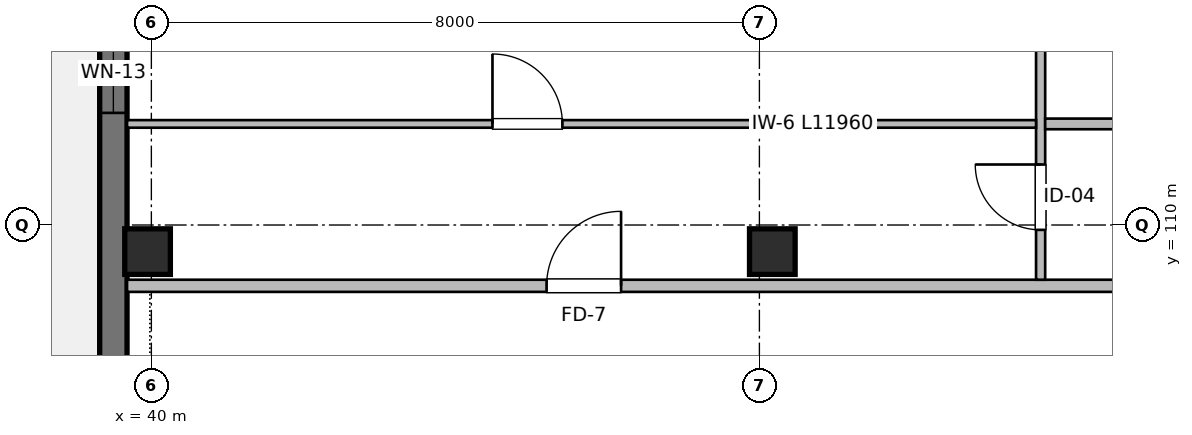
"""IFC4 building model, lengths in metres.
Left out: names, types, materials, properties, quantities, classifications, styles, units other than length and angle.
Written with IfcOpenShell. Run it as: python <this file> out.ifc"""

import sys

from ifc_helpers import new_model, si_unit, direction, frame, frame_2d, origin, origin_2d, place, context, subcontext, project, spatial, rectangle, extrude, element, fill, save


model = new_model("IFC4")
c1 = context("Model", 3, precision=1e-05, world=origin(), true_north=direction((0.0, 1.0)))
c2 = subcontext(c1, "Body", "Model", "MODEL_VIEW")
j1 = project(units=[si_unit("LENGTHUNIT", "METRE"), si_unit("PLANEANGLEUNIT", "RADIAN")], contexts=[c1])
p1 = place(None, origin())
s1 = spatial("IfcSite", under=j1, at=p1, CompositionType="ELEMENT")
p2 = place(p1, origin())
s2 = spatial("IfcBuilding", under=s1, at=p2, CompositionType="ELEMENT")
p3 = place(p2, frame((0.0, 0.0, 10.56)))
s3 = spatial("IfcBuildingStorey", under=s2, at=p3, CompositionType="ELEMENT", Elevation=10.56)
for number, where, z_axis, x_axis in (
    (1, (39.95, 109.65, 0.0), (0.0, 0.0, 1.0), (1.0, 0.0, 0.0)),
    (2, (48.17, 109.65, 0.0), (0.0, 0.0, 1.0), (1.0, 0.0, 0.0)),
):
    element("IfcColumn", number, at=place(p3, frame(where, z_axis=z_axis, x_axis=x_axis)), inside=s3, PredefinedType="COLUMN", context=c2, shape_type="SweptSolid", body=[
        extrude(rectangle(XDim=0.6, YDim=0.6, at=origin_2d()), origin(), (0.0, 0.0, 1.0), 3.2),
    ])
p4 = place(p3, frame((39.5, 100.0, 0.0), z_axis=(0.0, 0.0, 1.0), x_axis=(0.0, 1.0, 0.0)))
e3 = element("IfcWall", 3, at=p4, inside=s3, PredefinedType="SHEAR", context=c2, shape_type="SweptSolid", body=[
    extrude(rectangle(XDim=16.0, YDim=0.36, at=frame_2d((8.0, 0.0))), origin(), (0.0, 0.0, 1.0), 2.98),
])
p5 = place(p4, frame((3.4, 0.0, 0.0)))
e4 = element("IfcOpeningElement", 4, at=p5, cuts=e3, PredefinedType="OPENING", context=c2, shape_type="SweptSolid", body=[
    extrude(rectangle(XDim=1.2, YDim=2.2, at=frame_2d((0.6, 1.1))), frame((0.0, 0.19, 0.0), z_axis=(0.0, -1.0, 0.0), x_axis=(1.0, 0.0, 0.0)), (0.0, 0.0, 1.0), 0.38),
])
p6 = place(p4, frame((11.475, 0.0, 0.9)))
e5 = element("IfcOpeningElement", 5, at=p6, cuts=e3, PredefinedType="OPENING", context=c2, shape_type="SweptSolid", body=[
    extrude(rectangle(XDim=1.05, YDim=1.15, at=frame_2d((0.525, 0.575))), frame((0.0, 0.19, 0.0), z_axis=(0.0, -1.0, 0.0), x_axis=(1.0, 0.0, 0.0)), (0.0, 0.0, 1.0), 0.38),
])
p7 = place(p3, frame((39.68, 109.2, 0.0), z_axis=(0.0, 0.0, 1.0), x_axis=(1.0, 0.0, 0.0)))
e6 = element("IfcWall", 6, at=p7, inside=s3, PredefinedType="PARTITIONING", context=c2, shape_type="SweptSolid", body=[
    extrude(rectangle(XDim=41.64, YDim=0.16, at=frame_2d((20.82, 0.0))), origin(), (0.0, 0.0, 1.0), 2.935),
])
p8 = place(p7, frame((5.52, 0.0, 0.0)))
e7 = element("IfcOpeningElement", 7, at=p8, cuts=e6, PredefinedType="OPENING", context=c2, shape_type="SweptSolid", body=[
    extrude(rectangle(XDim=0.98, YDim=2.15, at=frame_2d((0.49, 1.075))), frame((0.0, 0.09, 0.0), z_axis=(0.0, -1.0, 0.0), x_axis=(1.0, 0.0, 0.0)), (0.0, 0.0, 1.0), 0.18),
])
p9 = place(p7, frame((26.43, 0.0, 0.0)))
e8 = element("IfcOpeningElement", 8, at=p9, cuts=e6, PredefinedType="OPENING", context=c2, shape_type="SweptSolid", body=[
    extrude(rectangle(XDim=0.98, YDim=2.15, at=frame_2d((0.49, 1.075))), frame((0.0, 0.09, 0.0), z_axis=(0.0, -1.0, 0.0), x_axis=(1.0, 0.0, 0.0)), (0.0, 0.0, 1.0), 0.18),
])
p10 = place(p3, frame((51.7, 109.28, 0.0), z_axis=(0.0, 0.0, 1.0), x_axis=(0.0, 1.0, 0.0)))
e9 = element("IfcWall", 9, at=p10, inside=s3, PredefinedType="PARTITIONING", context=c2, shape_type="SweptSolid", body=[
    extrude(rectangle(XDim=6.59, YDim=0.12, at=frame_2d((3.295, 0.0))), origin(), (0.0, 0.0, 1.0), 2.935),
])
p11 = place(p10, frame((0.656, 0.0, 0.0)))
e10 = element("IfcOpeningElement", 10, at=p11, cuts=e9, PredefinedType="OPENING", context=c2, shape_type="SweptSolid", body=[
    extrude(rectangle(XDim=0.86, YDim=2.1, at=frame_2d((0.43, 1.05))), frame((0.0, 0.07, 0.0), z_axis=(0.0, -1.0, 0.0), x_axis=(1.0, 0.0, 0.0)), (0.0, 0.0, 1.0), 0.14),
])
p12 = place(p10, frame((4.093, 0.0, 0.0)))
e11 = element("IfcOpeningElement", 11, at=p12, cuts=e9, PredefinedType="OPENING", context=c2, shape_type="SweptSolid", body=[
    extrude(rectangle(XDim=0.9, YDim=2.1, at=frame_2d((0.45, 1.05))), frame((0.0, 0.07, 0.0), z_axis=(0.0, -1.0, 0.0), x_axis=(1.0, 0.0, 0.0)), (0.0, 0.0, 1.0), 0.14),
])
p13 = place(p3, frame((51.76, 111.33, 0.0), z_axis=(0.0, 0.0, 1.0), x_axis=(1.0, 0.0, 0.0)))
e12 = element("IfcWall", 12, at=p13, inside=s3, PredefinedType="PARTITIONING", context=c2, shape_type="SweptSolid", body=[
    extrude(rectangle(XDim=8.65, YDim=0.14, at=frame_2d((4.325, 0.0))), origin(), (0.0, 0.0, 1.0), 2.935),
])
p14 = place(p13, frame((3.484, 0.0, 0.0)))
e13 = element("IfcOpeningElement", 13, at=p14, cuts=e12, PredefinedType="OPENING", context=c2, shape_type="SweptSolid", body=[
    extrude(rectangle(XDim=0.85, YDim=2.05, at=frame_2d((0.425, 1.025))), frame((0.0, 0.08, 0.0), z_axis=(0.0, -1.0, 0.0), x_axis=(1.0, 0.0, 0.0)), (0.0, 0.0, 1.0), 0.16),
])
p15 = place(p3, frame((39.68, 111.33, 0.0), z_axis=(0.0, 0.0, 1.0), x_axis=(1.0, 0.0, 0.0)))
e14 = element("IfcWall", 14, at=p15, inside=s3, PredefinedType="PARTITIONING", context=c2, shape_type="SweptSolid", body=[
    extrude(rectangle(XDim=11.96, YDim=0.1, at=frame_2d((5.98, 0.0))), origin(), (0.0, 0.0, 1.0), 2.935),
])
p16 = place(p15, frame((4.808, 0.0, 0.0)))
e15 = element("IfcOpeningElement", 15, at=p16, cuts=e14, PredefinedType="OPENING", context=c2, shape_type="SweptSolid", body=[
    extrude(rectangle(XDim=0.92, YDim=2.1, at=frame_2d((0.46, 1.05))), frame((0.0, 0.06, 0.0), z_axis=(0.0, -1.0, 0.0), x_axis=(1.0, 0.0, 0.0)), (0.0, 0.0, 1.0), 0.12),
])
p17 = place(p6, origin())
e16 = element("IfcWindow", 16, at=p17, inside=s3, PartitioningType="SINGLE_PANEL", PredefinedType="WINDOW", context=c2, shape_type="SweptSolid", body=[
    extrude(rectangle(XDim=1.05, YDim=1.15, at=frame_2d((0.525, 0.575))), frame((0.0, 0.03, 0.0), z_axis=(0.0, -1.0, 0.0), x_axis=(1.0, 0.0, 0.0)), (0.0, 0.0, 1.0), 0.06),
])
fill(e5, e16)
p18 = place(p8, origin())
e17 = element("IfcDoor", 17, at=p18, inside=s3, OperationType="SINGLE_SWING_RIGHT", PredefinedType="DOOR", context=c2, shape_type="SweptSolid", body=[
    extrude(rectangle(XDim=0.98, YDim=2.15, at=frame_2d((0.49, 1.075))), frame((0.0, 0.025, 0.0), z_axis=(0.0, -1.0, 0.0), x_axis=(1.0, 0.0, 0.0)), (0.0, 0.0, 1.0), 0.05),
])
fill(e7, e17)
p19 = place(p16, origin())
e18 = element("IfcDoor", 18, at=p19, inside=s3, OperationType="SINGLE_SWING_LEFT", PredefinedType="DOOR", context=c2, shape_type="SweptSolid", body=[
    extrude(rectangle(XDim=0.92, YDim=2.1, at=frame_2d((0.46, 1.05))), frame((0.0, 0.025, 0.0), z_axis=(0.0, -1.0, 0.0), x_axis=(1.0, 0.0, 0.0)), (0.0, 0.0, 1.0), 0.05),
])
fill(e15, e18)
p20 = place(p11, origin())
e19 = element("IfcDoor", 19, at=p20, inside=s3, OperationType="SINGLE_SWING_RIGHT", PredefinedType="DOOR", context=c2, shape_type="SweptSolid", body=[
    extrude(rectangle(XDim=0.86, YDim=2.1, at=frame_2d((0.43, 1.05))), frame((0.0, 0.025, 0.0), z_axis=(0.0, -1.0, 0.0), x_axis=(1.0, 0.0, 0.0)), (0.0, 0.0, 1.0), 0.05),
])
fill(e10, e19)
save(model, sys.argv[1])
